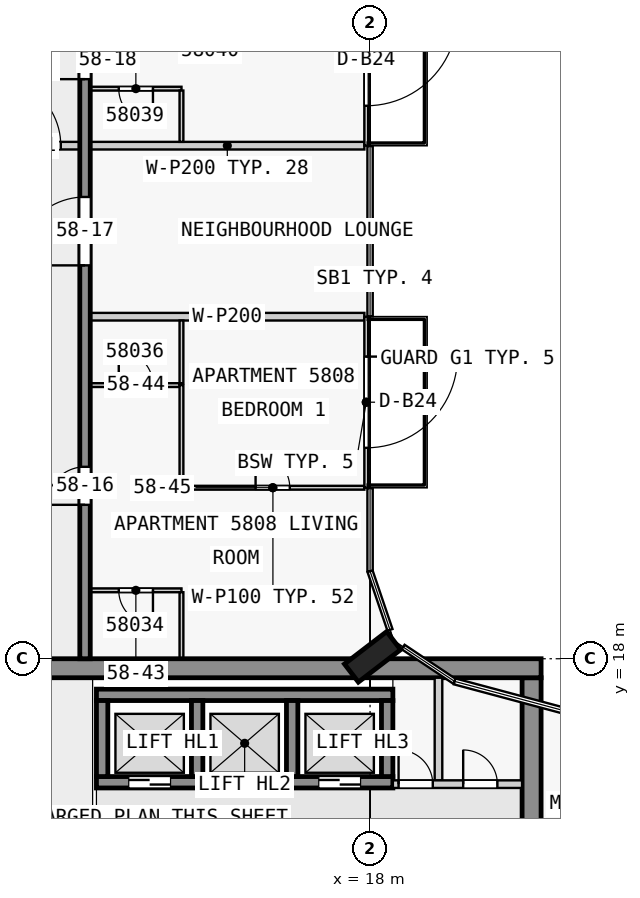
"""IFC4 building model, lengths in metres.
Left out: names, types, materials, properties, quantities, classifications, styles, units other than length and angle.
Written with IfcOpenShell. Run it as: python <this file> out.ifc"""

import sys

from ifc_helpers import new_model, si_unit, direction, frame, frame_2d, origin, origin_2d, place, context, subcontext, project, spatial, rectangle, extrude, element, fill, save


model = new_model("IFC4")
c1 = context("Model", 3, precision=1e-05, world=origin(), true_north=direction((0.0, 1.0)))
c2 = subcontext(c1, "Body", "Model", "MODEL_VIEW")
j1 = project(units=[si_unit("LENGTHUNIT", "METRE"), si_unit("PLANEANGLEUNIT", "RADIAN")], contexts=[c1])
p1 = place(None, origin())
s1 = spatial("IfcSite", under=j1, at=p1, CompositionType="ELEMENT")
p2 = place(p1, origin())
s2 = spatial("IfcBuilding", under=s1, at=p2, CompositionType="ELEMENT")
p3 = place(p2, frame((0.0, 0.0, 222.4)))
s3 = spatial("IfcBuildingStorey", under=s2, at=p3, CompositionType="ELEMENT", Elevation=222.4)
p4 = place(p3, frame((18.065, 18.05, 0.0), z_axis=(0.0, 0.0, 1.0), x_axis=(-0.608810846443, 0.793315418515, 0.0)))
e1 = element("IfcColumn", 1, at=p4, inside=s3, PredefinedType="COLUMN", context=c2, shape_type="SweptSolid", body=[
    extrude(rectangle(XDim=0.6, YDim=1.4, at=origin_2d()), origin(), (0.0, 0.0, 1.0), 3.5),
])
p5 = place(p3, frame((1.38, 17.75, 0.0), z_axis=(0.0, 0.0, 1.0), x_axis=(1.0, 0.0, 0.0)))
e2 = element("IfcWall", 2, at=p5, inside=s3, PredefinedType="SHEAR", context=c2, shape_type="SweptSolid", body=[
    extrude(rectangle(XDim=21.12, YDim=0.5, at=frame_2d((10.56, 0.0))), origin(), (0.0, 0.0, 1.0), 3.25),
])
p6 = place(p5, frame((6.3, 0.0, 0.0)))
e3 = element("IfcOpeningElement", 3, at=p6, cuts=e2, PredefinedType="OPENING", context=c2, shape_type="SweptSolid", body=[
    extrude(rectangle(XDim=1.8, YDim=2.1, at=frame_2d((0.9, 1.05))), frame((0.0, 0.26, 0.0), z_axis=(0.0, -1.0, 0.0), x_axis=(1.0, 0.0, 0.0)), (0.0, 0.0, 1.0), 0.52),
])
p7 = place(p3, frame((22.25, 2.5, 0.0), z_axis=(0.0, 0.0, 1.0), x_axis=(0.0, 1.0, 0.0)))
e4 = element("IfcWall", 4, at=p7, inside=s3, PredefinedType="SHEAR", context=c2, shape_type="SweptSolid", body=[
    extrude(rectangle(XDim=15.0, YDim=0.5, at=frame_2d((7.5, 0.0))), origin(), (0.0, 0.0, 1.0), 3.25),
])
p8 = place(p7, frame((5.6, 0.0, 0.0)))
e5 = element("IfcOpeningElement", 5, at=p8, cuts=e4, PredefinedType="OPENING", context=c2, shape_type="SweptSolid", body=[
    extrude(rectangle(XDim=1.8, YDim=2.1, at=frame_2d((0.9, 1.05))), frame((0.0, 0.26, 0.0), z_axis=(0.0, -1.0, 0.0), x_axis=(1.0, 0.0, 0.0)), (0.0, 0.0, 1.0), 0.52),
])
p9 = place(p3, frame((10.8, 17.05, 0.0), z_axis=(0.0, 0.0, 1.0), x_axis=(1.0, 0.0, 0.0)))
e6 = element("IfcWall", 6, at=p9, inside=s3, PredefinedType="SHEAR", context=c2, shape_type="SweptSolid", body=[
    extrude(rectangle(XDim=7.8, YDim=0.3, at=frame_2d((3.9, 0.0))), origin(), (0.0, 0.0, 1.0), 3.25),
])
p10 = place(p3, frame((10.8, 14.75, 0.0), z_axis=(0.0, 0.0, 1.0), x_axis=(1.0, 0.0, 0.0)))
e7 = element("IfcWall", 7, at=p10, inside=s3, PredefinedType="SHEAR", context=c2, shape_type="SweptSolid", body=[
    extrude(rectangle(XDim=7.8, YDim=0.3, at=frame_2d((3.9, 0.0))), origin(), (0.0, 0.0, 1.0), 3.25),
])
p11 = place(p10, frame((0.85, 0.0, 0.0)))
e8 = element("IfcOpeningElement", 8, at=p11, cuts=e7, PredefinedType="OPENING", context=c2, shape_type="SweptSolid", body=[
    extrude(rectangle(XDim=1.1, YDim=2.1, at=frame_2d((0.55, 1.05))), frame((0.0, 0.16, 0.0), z_axis=(0.0, -1.0, 0.0), x_axis=(1.0, 0.0, 0.0)), (0.0, 0.0, 1.0), 0.32),
])
p12 = place(p10, frame((3.35, 0.0, 0.0)))
e9 = element("IfcOpeningElement", 9, at=p12, cuts=e7, PredefinedType="OPENING", context=c2, shape_type="SweptSolid", body=[
    extrude(rectangle(XDim=1.1, YDim=2.1, at=frame_2d((0.55, 1.05))), frame((0.0, 0.16, 0.0), z_axis=(0.0, -1.0, 0.0), x_axis=(1.0, 0.0, 0.0)), (0.0, 0.0, 1.0), 0.32),
])
p13 = place(p10, frame((5.85, 0.0, 0.0)))
e10 = element("IfcOpeningElement", 10, at=p13, cuts=e7, PredefinedType="OPENING", context=c2, shape_type="SweptSolid", body=[
    extrude(rectangle(XDim=1.1, YDim=2.1, at=frame_2d((0.55, 1.05))), frame((0.0, 0.16, 0.0), z_axis=(0.0, -1.0, 0.0), x_axis=(1.0, 0.0, 0.0)), (0.0, 0.0, 1.0), 0.32),
])
for number, where, z_axis, x_axis in (
    (11, (10.95, 14.9, 0.0), (0.0, 0.0, 1.0), (0.0, 1.0, 0.0)),
    (12, (13.45, 14.9, 0.0), (0.0, 0.0, 1.0), (0.0, 1.0, 0.0)),
    (13, (15.95, 14.9, 0.0), (0.0, 0.0, 1.0), (0.0, 1.0, 0.0)),
    (14, (18.45, 14.9, 0.0), (0.0, 0.0, 1.0), (0.0, 1.0, 0.0)),
):
    element("IfcWall", number, at=place(p3, frame(where, z_axis=z_axis, x_axis=x_axis)), inside=s3, PredefinedType="SHEAR", context=c2, shape_type="SweptSolid", body=[
        extrude(rectangle(XDim=2.0, YDim=0.3, at=frame_2d((1.0, 0.0))), origin(), (0.0, 0.0, 1.0), 3.25),
    ])
p14 = place(p3, frame((10.5, 18.0, 0.0), z_axis=(0.0, 0.0, 1.0), x_axis=(0.0, 1.0, 0.0)))
e15 = element("IfcWall", 15, at=p14, inside=s3, PredefinedType="SHEAR", context=c2, shape_type="SweptSolid", body=[
    extrude(rectangle(XDim=27.0, YDim=0.275, at=frame_2d((13.5, 0.0))), origin(), (0.0, 0.0, 1.0), 3.25),
])
p15 = place(p14, frame((4.05, 0.0, 0.0)))
e16 = element("IfcOpeningElement", 16, at=p15, cuts=e15, PredefinedType="OPENING", context=c2, shape_type="SweptSolid", body=[
    extrude(rectangle(XDim=1.0, YDim=2.1, at=frame_2d((0.5, 1.05))), frame((0.0, 0.147, 0.0), z_axis=(0.0, -1.0, 0.0), x_axis=(1.0, 0.0, 0.0)), (0.0, 0.0, 1.0), 0.295),
])
p16 = place(p14, frame((10.35, 0.0, 0.0)))
e17 = element("IfcOpeningElement", 17, at=p16, cuts=e15, PredefinedType="OPENING", context=c2, shape_type="SweptSolid", body=[
    extrude(rectangle(XDim=1.8, YDim=2.1, at=frame_2d((0.9, 1.05))), frame((0.0, 0.147, 0.0), z_axis=(0.0, -1.0, 0.0), x_axis=(1.0, 0.0, 0.0)), (0.0, 0.0, 1.0), 0.295),
])
p17 = place(p14, frame((15.25, 0.0, 0.0)))
e18 = element("IfcOpeningElement", 18, at=p17, cuts=e15, PredefinedType="OPENING", context=c2, shape_type="SweptSolid", body=[
    extrude(rectangle(XDim=1.0, YDim=2.1, at=frame_2d((0.5, 1.05))), frame((0.0, 0.147, 0.0), z_axis=(0.0, -1.0, 0.0), x_axis=(1.0, 0.0, 0.0)), (0.0, 0.0, 1.0), 0.295),
])
p18 = place(p14, frame((21.35, 0.0, 0.0)))
e19 = element("IfcOpeningElement", 19, at=p18, cuts=e15, PredefinedType="OPENING", context=c2, shape_type="SweptSolid", body=[
    extrude(rectangle(XDim=1.0, YDim=2.1, at=frame_2d((0.5, 1.05))), frame((0.0, 0.147, 0.0), z_axis=(0.0, -1.0, 0.0), x_axis=(1.0, 0.0, 0.0)), (0.0, 0.0, 1.0), 0.295),
])
p19 = place(p3, frame((17.9, 27.0, 0.0), z_axis=(0.0, 0.0, 1.0), x_axis=(0.0, -1.0, 0.0)))
e20 = element("IfcWall", 20, at=p19, inside=s3, PredefinedType="STANDARD", context=c2, shape_type="SweptSolid", body=[
    extrude(rectangle(XDim=4.5, YDim=0.1, at=frame_2d((2.25, 0.0))), origin(), (0.0, 0.0, 1.0), 3.25),
])
p20 = place(p19, frame((1.05, 0.0, 0.0)))
e21 = element("IfcOpeningElement", 21, at=p20, cuts=e20, PredefinedType="OPENING", context=c2, shape_type="SweptSolid", body=[
    extrude(rectangle(XDim=2.4, YDim=2.4, at=frame_2d((1.2, 1.2))), frame((0.0, 0.06, 0.0), z_axis=(0.0, -1.0, 0.0), x_axis=(1.0, 0.0, 0.0)), (0.0, 0.0, 1.0), 0.12),
])
p21 = place(p3, frame((17.9, 36.0, 0.0), z_axis=(0.0, 0.0, 1.0), x_axis=(0.0, -1.0, 0.0)))
e22 = element("IfcWall", 22, at=p21, inside=s3, PredefinedType="STANDARD", context=c2, shape_type="SweptSolid", body=[
    extrude(rectangle(XDim=4.5, YDim=0.1, at=frame_2d((2.25, 0.0))), origin(), (0.0, 0.0, 1.0), 3.25),
])
p22 = place(p21, frame((1.05, 0.0, 0.0)))
e23 = element("IfcOpeningElement", 23, at=p22, cuts=e22, PredefinedType="OPENING", context=c2, shape_type="SweptSolid", body=[
    extrude(rectangle(XDim=2.4, YDim=2.4, at=frame_2d((1.2, 1.2))), frame((0.0, 0.06, 0.0), z_axis=(0.0, -1.0, 0.0), x_axis=(1.0, 0.0, 0.0)), (0.0, 0.0, 1.0), 0.12),
])
p23 = place(p3, frame((18.6, 14.7, 0.0), z_axis=(0.0, 0.0, 1.0), x_axis=(1.0, 0.0, 0.0)))
e24 = element("IfcWall", 24, at=p23, inside=s3, PredefinedType="PARTITIONING", context=c2, shape_type="SweptSolid", body=[
    extrude(rectangle(XDim=3.4, YDim=0.2, at=frame_2d((1.7, 0.0))), origin(), (0.0, 0.0, 1.0), 3.25),
])
p24 = place(p23, frame((0.15, 0.0, 0.0)))
e25 = element("IfcOpeningElement", 25, at=p24, cuts=e24, PredefinedType="OPENING", context=c2, shape_type="SweptSolid", body=[
    extrude(rectangle(XDim=0.9, YDim=2.1, at=frame_2d((0.45, 1.05))), frame((0.0, 0.11, 0.0), z_axis=(0.0, -1.0, 0.0), x_axis=(1.0, 0.0, 0.0)), (0.0, 0.0, 1.0), 0.22),
])
p25 = place(p23, frame((1.85, 0.0, 0.0)))
e26 = element("IfcOpeningElement", 26, at=p25, cuts=e24, PredefinedType="OPENING", context=c2, shape_type="SweptSolid", body=[
    extrude(rectangle(XDim=0.9, YDim=2.1, at=frame_2d((0.45, 1.05))), frame((0.0, 0.11, 0.0), z_axis=(0.0, -1.0, 0.0), x_axis=(1.0, 0.0, 0.0)), (0.0, 0.0, 1.0), 0.22),
])
p26 = place(p3, frame((19.8, 14.8, 0.0), z_axis=(0.0, 0.0, 1.0), x_axis=(0.0, 1.0, 0.0)))
e27 = element("IfcWall", 27, at=p26, inside=s3, PredefinedType="PARTITIONING", context=c2, shape_type="SweptSolid", body=[
    extrude(rectangle(XDim=2.7, YDim=0.2, at=frame_2d((1.35, 0.0))), origin(), (0.0, 0.0, 1.0), 3.25),
])
p27 = place(p3, frame((13.038, 19.8, 0.0), z_axis=(0.0, 0.0, 1.0), x_axis=(-1.0, 0.0, 0.0)))
e28 = element("IfcWall", 28, at=p27, inside=s3, PredefinedType="PARTITIONING", context=c2, shape_type="SweptSolid", body=[
    extrude(rectangle(XDim=2.4, YDim=0.1, at=frame_2d((1.2, 0.0))), origin(), (0.0, 0.0, 1.0), 3.25),
])
p28 = place(p27, frame((0.75, 0.0, 0.0)))
e29 = element("IfcOpeningElement", 29, at=p28, cuts=e28, PredefinedType="OPENING", context=c2, shape_type="SweptSolid", body=[
    extrude(rectangle(XDim=0.9, YDim=2.1, at=frame_2d((0.45, 1.05))), frame((0.0, 0.06, 0.0), z_axis=(0.0, -1.0, 0.0), x_axis=(1.0, 0.0, 0.0)), (0.0, 0.0, 1.0), 0.12),
])
p29 = place(p3, frame((13.038, 22.5, 0.0), z_axis=(0.0, 0.0, 1.0), x_axis=(1.0, 0.0, 0.0)))
e30 = element("IfcWall", 30, at=p29, inside=s3, PredefinedType="PARTITIONING", context=c2, shape_type="SweptSolid", body=[
    extrude(rectangle(XDim=4.812, YDim=0.1, at=frame_2d((2.406, 0.0))), origin(), (0.0, 0.0, 1.0), 3.25),
])
p30 = place(p29, frame((1.95, 0.0, 0.0)))
e31 = element("IfcOpeningElement", 31, at=p30, cuts=e30, PredefinedType="OPENING", context=c2, shape_type="SweptSolid", body=[
    extrude(rectangle(XDim=0.9, YDim=2.1, at=frame_2d((0.45, 1.05))), frame((0.0, 0.06, 0.0), z_axis=(0.0, -1.0, 0.0), x_axis=(1.0, 0.0, 0.0)), (0.0, 0.0, 1.0), 0.12),
])
p31 = place(p3, frame((10.637, 25.2, 0.0), z_axis=(0.0, 0.0, 1.0), x_axis=(1.0, 0.0, 0.0)))
e32 = element("IfcWall", 32, at=p31, inside=s3, PredefinedType="PARTITIONING", context=c2, shape_type="SweptSolid", body=[
    extrude(rectangle(XDim=2.35, YDim=0.1, at=frame_2d((1.175, 0.0))), origin(), (0.0, 0.0, 1.0), 3.25),
])
p32 = place(p31, frame((0.75, 0.0, 0.0)))
e33 = element("IfcOpeningElement", 33, at=p32, cuts=e32, PredefinedType="OPENING", context=c2, shape_type="SweptSolid", body=[
    extrude(rectangle(XDim=0.9, YDim=2.1, at=frame_2d((0.45, 1.05))), frame((0.0, 0.06, 0.0), z_axis=(0.0, -1.0, 0.0), x_axis=(1.0, 0.0, 0.0)), (0.0, 0.0, 1.0), 0.12),
])
for number, where, z_axis, x_axis in (
    (34, (17.85, 27.0, 0.0), (0.0, 0.0, 1.0), (-1.0, 0.0, 0.0)),
    (35, (17.85, 31.5, 0.0), (0.0, 0.0, 1.0), (-1.0, 0.0, 0.0)),
):
    element("IfcWall", number, at=place(p3, frame(where, z_axis=z_axis, x_axis=x_axis)), inside=s3, PredefinedType="PARTITIONING", context=c2, shape_type="SweptSolid", body=[
        extrude(rectangle(XDim=7.213, YDim=0.2, at=frame_2d((3.606, 0.0))), origin(), (0.0, 0.0, 1.0), 3.25),
    ])
p33 = place(p3, frame((13.038, 33.0, 0.0), z_axis=(0.0, 0.0, 1.0), x_axis=(-1.0, 0.0, 0.0)))
e36 = element("IfcWall", 36, at=p33, inside=s3, PredefinedType="PARTITIONING", context=c2, shape_type="SweptSolid", body=[
    extrude(rectangle(XDim=2.4, YDim=0.1, at=frame_2d((1.2, 0.0))), origin(), (0.0, 0.0, 1.0), 3.25),
])
p34 = place(p33, frame((0.75, 0.0, 0.0)))
e37 = element("IfcOpeningElement", 37, at=p34, cuts=e36, PredefinedType="OPENING", context=c2, shape_type="SweptSolid", body=[
    extrude(rectangle(XDim=0.9, YDim=2.1, at=frame_2d((0.45, 1.05))), frame((0.0, 0.06, 0.0), z_axis=(0.0, -1.0, 0.0), x_axis=(1.0, 0.0, 0.0)), (0.0, 0.0, 1.0), 0.12),
])
p35 = place(p3, frame((13.038, 25.2, 0.0), z_axis=(0.0, 0.0, 1.0), x_axis=(0.0, -1.0, 0.0)))
e38 = element("IfcWall", 38, at=p35, inside=s3, PredefinedType="PARTITIONING", context=c2, shape_type="SweptSolid", body=[
    extrude(rectangle(XDim=2.65, YDim=0.1, at=frame_2d((1.325, 0.0))), origin(), (0.0, 0.0, 1.0), 3.25),
])
p36 = place(p3, frame((13.038, 18.0, 0.0), z_axis=(0.0, 0.0, 1.0), x_axis=(0.0, 1.0, 0.0)))
e39 = element("IfcWall", 39, at=p36, inside=s3, PredefinedType="PARTITIONING", context=c2, shape_type="SweptSolid", body=[
    extrude(rectangle(XDim=1.75, YDim=0.1, at=frame_2d((0.875, 0.0))), origin(), (0.0, 0.0, 1.0), 3.25),
])
p37 = place(p3, frame((13.038, 25.25, 0.0), z_axis=(0.0, 0.0, 1.0), x_axis=(0.0, 1.0, 0.0)))
e40 = element("IfcWall", 40, at=p37, inside=s3, PredefinedType="PARTITIONING", context=c2, shape_type="SweptSolid", body=[
    extrude(rectangle(XDim=1.65, YDim=0.1, at=frame_2d((0.825, 0.0))), origin(), (0.0, 0.0, 1.0), 3.25),
])
p38 = place(p3, frame((13.038, 31.6, 0.0), z_axis=(0.0, 0.0, 1.0), x_axis=(0.0, 1.0, 0.0)))
e41 = element("IfcWall", 41, at=p38, inside=s3, PredefinedType="PARTITIONING", context=c2, shape_type="SweptSolid", body=[
    extrude(rectangle(XDim=1.35, YDim=0.1, at=frame_2d((0.675, 0.0))), origin(), (0.0, 0.0, 1.0), 3.25),
])
p39 = place(p3, frame((7.363, 31.5, 0.0), z_axis=(0.0, 0.0, 1.0), x_axis=(1.0, 0.0, 0.0)))
e42 = element("IfcWall", 42, at=p39, inside=s3, PredefinedType="PARTITIONING", context=c2, shape_type="SweptSolid", body=[
    extrude(rectangle(XDim=3.175, YDim=0.2, at=frame_2d((1.587, 0.0))), origin(), (0.0, 0.0, 1.0), 3.25),
])
p40 = place(p39, frame((0.7, 0.0, 0.0)))
e43 = element("IfcOpeningElement", 43, at=p40, cuts=e42, PredefinedType="OPENING", context=c2, shape_type="SweptSolid", body=[
    extrude(rectangle(XDim=1.8, YDim=2.1, at=frame_2d((0.9, 1.05))), frame((0.0, 0.11, 0.0), z_axis=(0.0, -1.0, 0.0), x_axis=(1.0, 0.0, 0.0)), (0.0, 0.0, 1.0), 0.22),
])
p41 = place(p20, origin())
e44 = element("IfcDoor", 44, at=p41, inside=s3, OperationType="SINGLE_SWING_LEFT", PredefinedType="DOOR", context=c2, shape_type="SweptSolid", body=[
    extrude(rectangle(XDim=2.4, YDim=2.4, at=frame_2d((1.2, 1.2))), frame((0.0, 0.025, 0.0), z_axis=(0.0, -1.0, 0.0), x_axis=(1.0, 0.0, 0.0)), (0.0, 0.0, 1.0), 0.05),
])
fill(e21, e44)
p42 = place(p22, origin())
e45 = element("IfcDoor", 45, at=p42, inside=s3, OperationType="SINGLE_SWING_LEFT", PredefinedType="DOOR", context=c2, shape_type="SweptSolid", body=[
    extrude(rectangle(XDim=2.4, YDim=2.4, at=frame_2d((1.2, 1.2))), frame((0.0, 0.025, 0.0), z_axis=(0.0, -1.0, 0.0), x_axis=(1.0, 0.0, 0.0)), (0.0, 0.0, 1.0), 0.05),
])
fill(e23, e45)
p43 = place(p11, origin())
e46 = element("IfcDoor", 46, at=p43, inside=s3, OperationType="DOUBLE_DOOR_SLIDING", PredefinedType="DOOR", context=c2, shape_type="SweptSolid", body=[
    extrude(rectangle(XDim=1.1, YDim=2.1, at=frame_2d((0.55, 1.05))), frame((0.0, 0.025, 0.0), z_axis=(0.0, -1.0, 0.0), x_axis=(1.0, 0.0, 0.0)), (0.0, 0.0, 1.0), 0.05),
])
fill(e8, e46)
p44 = place(p12, origin())
e47 = element("IfcDoor", 47, at=p44, inside=s3, OperationType="DOUBLE_DOOR_SLIDING", PredefinedType="DOOR", context=c2, shape_type="SweptSolid", body=[
    extrude(rectangle(XDim=1.1, YDim=2.1, at=frame_2d((0.55, 1.05))), frame((0.0, 0.025, 0.0), z_axis=(0.0, -1.0, 0.0), x_axis=(1.0, 0.0, 0.0)), (0.0, 0.0, 1.0), 0.05),
])
fill(e9, e47)
p45 = place(p13, origin())
e48 = element("IfcDoor", 48, at=p45, inside=s3, OperationType="DOUBLE_DOOR_SLIDING", PredefinedType="DOOR", context=c2, shape_type="SweptSolid", body=[
    extrude(rectangle(XDim=1.1, YDim=2.1, at=frame_2d((0.55, 1.05))), frame((0.0, 0.025, 0.0), z_axis=(0.0, -1.0, 0.0), x_axis=(1.0, 0.0, 0.0)), (0.0, 0.0, 1.0), 0.05),
])
fill(e10, e48)
p46 = place(p24, origin())
e49 = element("IfcDoor", 49, at=p46, inside=s3, OperationType="SINGLE_SWING_LEFT", PredefinedType="DOOR", context=c2, shape_type="SweptSolid", body=[
    extrude(rectangle(XDim=0.9, YDim=2.1, at=frame_2d((0.45, 1.05))), frame((0.0, 0.025, 0.0), z_axis=(0.0, -1.0, 0.0), x_axis=(1.0, 0.0, 0.0)), (0.0, 0.0, 1.0), 0.05),
])
fill(e25, e49)
p47 = place(p25, origin())
e50 = element("IfcDoor", 50, at=p47, inside=s3, OperationType="SINGLE_SWING_LEFT", PredefinedType="DOOR", context=c2, shape_type="SweptSolid", body=[
    extrude(rectangle(XDim=0.9, YDim=2.1, at=frame_2d((0.45, 1.05))), frame((0.0, 0.025, 0.0), z_axis=(0.0, -1.0, 0.0), x_axis=(1.0, 0.0, 0.0)), (0.0, 0.0, 1.0), 0.05),
])
fill(e26, e50)
p48 = place(p15, origin())
e51 = element("IfcDoor", 51, at=p48, inside=s3, OperationType="SINGLE_SWING_LEFT", PredefinedType="DOOR", context=c2, shape_type="SweptSolid", body=[
    extrude(rectangle(XDim=1.0, YDim=2.1, at=frame_2d((0.5, 1.05))), frame((0.0, 0.025, 0.0), z_axis=(0.0, -1.0, 0.0), x_axis=(1.0, 0.0, 0.0)), (0.0, 0.0, 1.0), 0.05),
])
fill(e16, e51)
p49 = place(p16, origin())
e52 = element("IfcDoor", 52, at=p49, inside=s3, OperationType="SINGLE_SWING_LEFT", PredefinedType="DOOR", context=c2, shape_type="SweptSolid", body=[
    extrude(rectangle(XDim=1.8, YDim=2.1, at=frame_2d((0.9, 1.05))), frame((0.0, 0.025, 0.0), z_axis=(0.0, -1.0, 0.0), x_axis=(1.0, 0.0, 0.0)), (0.0, 0.0, 1.0), 0.05),
])
fill(e17, e52)
p50 = place(p17, origin())
e53 = element("IfcDoor", 53, at=p50, inside=s3, OperationType="SINGLE_SWING_RIGHT", PredefinedType="DOOR", context=c2, shape_type="SweptSolid", body=[
    extrude(rectangle(XDim=1.0, YDim=2.1, at=frame_2d((0.5, 1.05))), frame((0.0, 0.025, 0.0), z_axis=(0.0, -1.0, 0.0), x_axis=(1.0, 0.0, 0.0)), (0.0, 0.0, 1.0), 0.05),
])
fill(e18, e53)
p51 = place(p40, origin())
e54 = element("IfcDoor", 54, at=p51, inside=s3, OperationType="SINGLE_SWING_RIGHT", PredefinedType="DOOR", context=c2, shape_type="SweptSolid", body=[
    extrude(rectangle(XDim=1.8, YDim=2.1, at=frame_2d((0.9, 1.05))), frame((0.0, 0.025, 0.0), z_axis=(0.0, -1.0, 0.0), x_axis=(1.0, 0.0, 0.0)), (0.0, 0.0, 1.0), 0.05),
])
fill(e43, e54)
p52 = place(p28, origin())
e55 = element("IfcDoor", 55, at=p52, inside=s3, OperationType="SINGLE_SWING_LEFT", PredefinedType="DOOR", context=c2, shape_type="SweptSolid", body=[
    extrude(rectangle(XDim=0.9, YDim=2.1, at=frame_2d((0.45, 1.05))), frame((0.0, 0.025, 0.0), z_axis=(0.0, -1.0, 0.0), x_axis=(1.0, 0.0, 0.0)), (0.0, 0.0, 1.0), 0.05),
])
fill(e29, e55)
p53 = place(p32, origin())
e56 = element("IfcDoor", 56, at=p53, inside=s3, OperationType="SINGLE_SWING_RIGHT", PredefinedType="DOOR", context=c2, shape_type="SweptSolid", body=[
    extrude(rectangle(XDim=0.9, YDim=2.1, at=frame_2d((0.45, 1.05))), frame((0.0, 0.025, 0.0), z_axis=(0.0, -1.0, 0.0), x_axis=(1.0, 0.0, 0.0)), (0.0, 0.0, 1.0), 0.05),
])
fill(e33, e56)
p54 = place(p30, origin())
e57 = element("IfcDoor", 57, at=p54, inside=s3, OperationType="SINGLE_SWING_LEFT", PredefinedType="DOOR", context=c2, shape_type="SweptSolid", body=[
    extrude(rectangle(XDim=0.9, YDim=2.1, at=frame_2d((0.45, 1.05))), frame((0.0, 0.025, 0.0), z_axis=(0.0, -1.0, 0.0), x_axis=(1.0, 0.0, 0.0)), (0.0, 0.0, 1.0), 0.05),
])
fill(e31, e57)
p55 = place(p34, origin())
e58 = element("IfcDoor", 58, at=p55, inside=s3, OperationType="SINGLE_SWING_LEFT", PredefinedType="DOOR", context=c2, shape_type="SweptSolid", body=[
    extrude(rectangle(XDim=0.9, YDim=2.1, at=frame_2d((0.45, 1.05))), frame((0.0, 0.025, 0.0), z_axis=(0.0, -1.0, 0.0), x_axis=(1.0, 0.0, 0.0)), (0.0, 0.0, 1.0), 0.05),
])
fill(e37, e58)
save(model, sys.argv[1])
